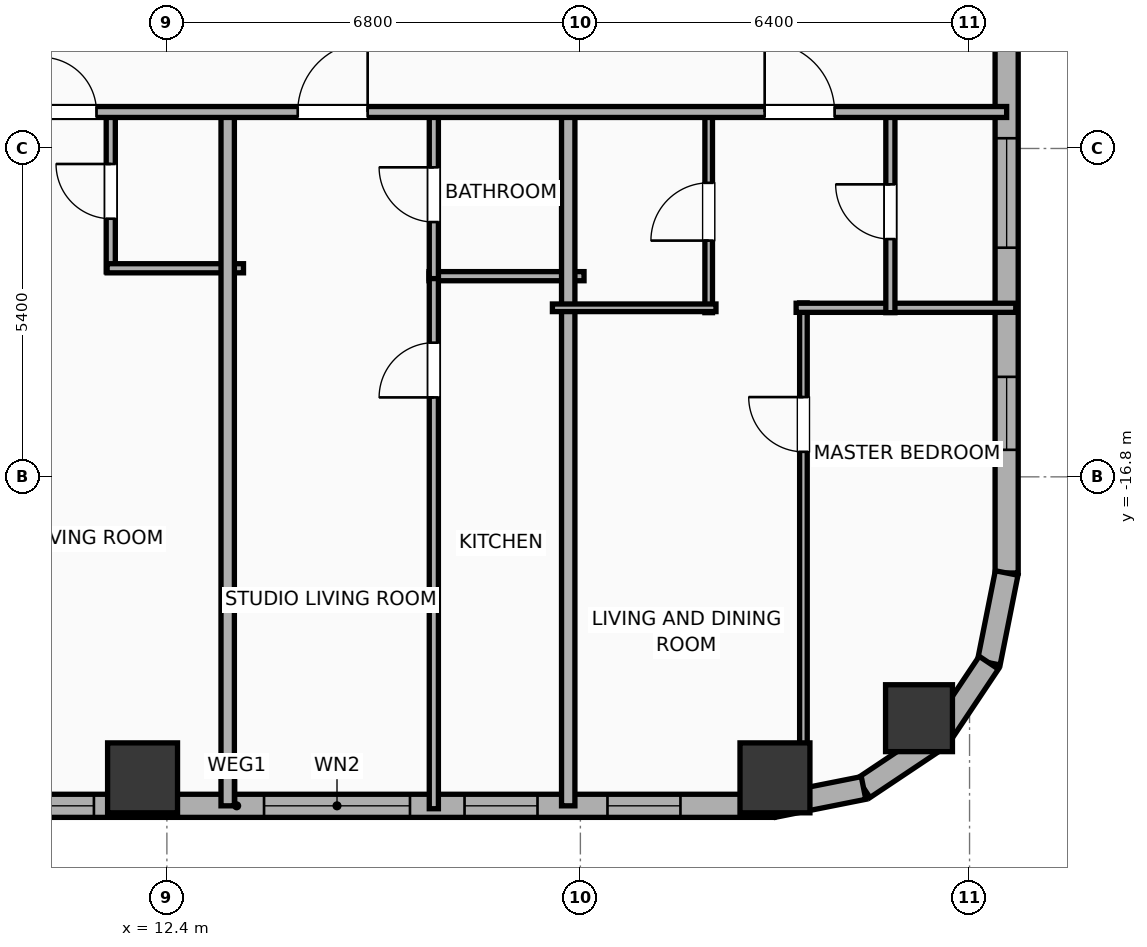
"""IFC4 building model, lengths in metres.
Left out: names, types, materials, properties, quantities, classifications, styles, units other than length and angle.
Written with IfcOpenShell. Run it as: python <this file> out.ifc"""

import sys

from ifc_helpers import new_model, si_unit, direction, frame, frame_2d, origin, origin_2d, place, context, subcontext, project, spatial, rectangle, hollow_rectangle, hollow_circle, extrude, element, fill, save


model = new_model("IFC4")
c1 = context("Model", 3, precision=1e-05, world=origin(), true_north=direction((0.0, 1.0)))
c2 = subcontext(c1, "Body", "Model", "MODEL_VIEW")
j1 = project(units=[si_unit("LENGTHUNIT", "METRE"), si_unit("PLANEANGLEUNIT", "RADIAN")], contexts=[c1])
p1 = place(None, origin())
s1 = spatial("IfcSite", under=j1, at=p1, CompositionType="ELEMENT")
p2 = place(p1, origin())
s2 = spatial("IfcBuilding", under=s1, at=p2, CompositionType="ELEMENT")
p3 = place(p2, frame((0.0, 0.0, 61.1)))
s3 = spatial("IfcBuildingStorey", under=s2, at=p3, CompositionType="ELEMENT", Elevation=61.1)
for number, where, z_axis, x_axis in (
    (1, (12.0, -21.75, 0.0), (0.0, 0.0, 1.0), (1.0, 0.0, 0.0)),
    (2, (22.4, -21.75, 0.0), (0.0, 0.0, 1.0), (1.0, 0.0, 0.0)),
):
    element("IfcColumn", number, at=place(p3, frame(where, z_axis=z_axis, x_axis=x_axis)), inside=s3, PredefinedType="COLUMN", context=c2, shape_type="SweptSolid", body=[
        extrude(hollow_rectangle(XDim=1.15, YDim=1.15, WallThickness=0.04, at=origin_2d()), origin(), (0.0, 0.0, 1.0), 3.9),
    ])
p4 = place(p3, frame((24.769, -20.769, 0.0), z_axis=(0.0, 0.0, 1.0), x_axis=(1.0, 0.0, 0.0)))
e3 = element("IfcColumn", 3, at=p4, inside=s3, PredefinedType="COLUMN", context=c2, shape_type="SweptSolid", body=[
    extrude(hollow_circle(Radius=0.55, WallThickness=0.036, at=origin_2d()), origin(), (0.0, 0.0, 1.0), 3.9),
])
p5 = place(p3, frame((22.381, -22.21, 0.0), z_axis=(0.0, 0.0, 1.0), x_axis=(-1.0, 0.0, 0.0)))
e4 = element("IfcWall", 4, at=p5, inside=s3, PredefinedType="ELEMENTEDWALL", context=c2, shape_type="SweptSolid", body=[
    extrude(rectangle(XDim=17.667, YDim=0.38, at=frame_2d((8.833, 0.0))), origin(), (0.0, 0.0, 1.0), 3.65),
])
p6 = place(p5, frame((5.984, 0.0, 0.75)))
e5 = element("IfcOpeningElement", 5, at=p6, cuts=e4, PredefinedType="OPENING", context=c2, shape_type="SweptSolid", body=[
    extrude(rectangle(XDim=2.4, YDim=2.1, at=frame_2d((1.2, 1.05))), frame((0.0, 0.2, 0.0), z_axis=(0.0, -1.0, 0.0), x_axis=(1.0, 0.0, 0.0)), (0.0, 0.0, 1.0), 0.4),
])
p7 = place(p5, frame((15.079, 0.0, 0.75)))
e6 = element("IfcOpeningElement", 6, at=p7, cuts=e4, PredefinedType="OPENING", context=c2, shape_type="SweptSolid", body=[
    extrude(rectangle(XDim=1.2, YDim=2.05, at=frame_2d((0.6, 1.025))), frame((0.0, 0.2, 0.0), z_axis=(0.0, -1.0, 0.0), x_axis=(1.0, 0.0, 0.0)), (0.0, 0.0, 1.0), 0.4),
])
p8 = place(p5, frame((11.181, 0.0, 0.75)))
e7 = element("IfcOpeningElement", 7, at=p8, cuts=e4, PredefinedType="OPENING", context=c2, shape_type="SweptSolid", body=[
    extrude(rectangle(XDim=1.2, YDim=2.05, at=frame_2d((0.6, 1.025))), frame((0.0, 0.2, 0.0), z_axis=(0.0, -1.0, 0.0), x_axis=(1.0, 0.0, 0.0)), (0.0, 0.0, 1.0), 0.4),
])
p9 = place(p5, frame((3.886, 0.0, 0.75)))
e8 = element("IfcOpeningElement", 8, at=p9, cuts=e4, PredefinedType="OPENING", context=c2, shape_type="SweptSolid", body=[
    extrude(rectangle(XDim=1.2, YDim=2.05, at=frame_2d((0.6, 1.025))), frame((0.0, 0.2, 0.0), z_axis=(0.0, -1.0, 0.0), x_axis=(1.0, 0.0, 0.0)), (0.0, 0.0, 1.0), 0.4),
])
p10 = place(p5, frame((1.536, 0.0, 0.75)))
e9 = element("IfcOpeningElement", 9, at=p10, cuts=e4, PredefinedType="OPENING", context=c2, shape_type="SweptSolid", body=[
    extrude(rectangle(XDim=1.2, YDim=2.05, at=frame_2d((0.6, 1.025))), frame((0.0, 0.2, 0.0), z_axis=(0.0, -1.0, 0.0), x_axis=(1.0, 0.0, 0.0)), (0.0, 0.0, 1.0), 0.4),
])
p11 = place(p3, frame((26.21, -5.882, 0.0), z_axis=(0.0, 0.0, 1.0), x_axis=(0.0, -1.0, 0.0)))
e10 = element("IfcWall", 10, at=p11, inside=s3, PredefinedType="ELEMENTEDWALL", context=c2, shape_type="SweptSolid", body=[
    extrude(rectangle(XDim=12.499, YDim=0.38, at=frame_2d((6.25, 0.0))), origin(), (0.0, 0.0, 1.0), 3.65),
])
p12 = place(p11, frame((5.35, 0.0, 0.75)))
e11 = element("IfcOpeningElement", 11, at=p12, cuts=e10, PredefinedType="OPENING", context=c2, shape_type="SweptSolid", body=[
    extrude(rectangle(XDim=1.8, YDim=2.1, at=frame_2d((0.9, 1.05))), frame((0.0, 0.2, 0.0), z_axis=(0.0, -1.0, 0.0), x_axis=(1.0, 0.0, 0.0)), (0.0, 0.0, 1.0), 0.4),
])
p13 = place(p11, frame((9.274, 0.0, 0.75)))
e12 = element("IfcOpeningElement", 12, at=p13, cuts=e10, PredefinedType="OPENING", context=c2, shape_type="SweptSolid", body=[
    extrude(rectangle(XDim=1.2, YDim=2.05, at=frame_2d((0.6, 1.025))), frame((0.0, 0.2, 0.0), z_axis=(0.0, -1.0, 0.0), x_axis=(1.0, 0.0, 0.0)), (0.0, 0.0, 1.0), 0.4),
])
p14 = place(p3, frame((26.21, -18.381, 0.0), z_axis=(0.0, 0.0, 1.0), x_axis=(-0.195086038585, -0.980786132421, 0.0)))
e13 = element("IfcWall", 13, at=p14, inside=s3, PredefinedType="ELEMENTEDWALL", context=c2, shape_type="SweptSolid", body=[
    extrude(rectangle(XDim=1.504, YDim=0.38, at=frame_2d((0.752, 0.0))), origin(), (0.0, 0.0, 1.0), 3.65),
])
for number, where, z_axis, x_axis in (
    (14, (25.917, -19.857, 0.0), (0.0, 0.0, 1.0), (-0.556, -0.831, 0.0)),
    (15, (25.091, -21.091, 0.0), (0.0, 0.0, 1.0), (-0.831, -0.556, 0.0)),
):
    element("IfcWall", number, at=place(p3, frame(where, z_axis=z_axis, x_axis=x_axis)), inside=s3, PredefinedType="ELEMENTEDWALL", context=c2, shape_type="SweptSolid", body=[
        extrude(rectangle(XDim=1.485, YDim=0.38, at=frame_2d((0.743, 0.0))), origin(), (0.0, 0.0, 1.0), 3.65),
    ])
p15 = place(p3, frame((23.857, -21.917, 0.0), z_axis=(0.0, 0.0, 1.0), x_axis=(-0.980786132421, -0.195086038585, 0.0)))
e16 = element("IfcWall", 16, at=p15, inside=s3, PredefinedType="ELEMENTEDWALL", context=c2, shape_type="SweptSolid", body=[
    extrude(rectangle(XDim=1.504, YDim=0.38, at=frame_2d((0.752, 0.0))), origin(), (0.0, 0.0, 1.0), 3.65),
])
p16 = place(p3, frame((11.477, -13.43, 0.0), z_axis=(0.0, 0.0, 1.0), x_axis=(0.0, 1.0, 0.0)))
e17 = element("IfcWall", 17, at=p16, inside=s3, PredefinedType="PLUMBINGWALL", context=c2, shape_type="SweptSolid", body=[
    extrude(rectangle(XDim=2.65, YDim=0.15, at=frame_2d((1.325, 0.0))), origin(), (0.0, 0.0, 1.0), 3.65),
])
p17 = place(p16, frame((0.875, 0.0, 0.0)))
e18 = element("IfcOpeningElement", 18, at=p17, cuts=e17, PredefinedType="OPENING", context=c2, shape_type="SweptSolid", body=[
    extrude(rectangle(XDim=0.9, YDim=2.05, at=frame_2d((0.45, 1.025))), frame((0.0, 0.085, 0.0), z_axis=(0.0, -1.0, 0.0), x_axis=(1.0, 0.0, 0.0)), (0.0, 0.0, 1.0), 0.17),
])
p18 = place(p3, frame((11.417, -13.37, 0.0), z_axis=(0.0, 0.0, 1.0), x_axis=(1.0, 0.0, 0.0)))
e19 = element("IfcWall", 19, at=p18, inside=s3, PredefinedType="PLUMBINGWALL", context=c2, shape_type="SweptSolid", body=[
    extrude(rectangle(XDim=2.243, YDim=0.15, at=frame_2d((1.122, 0.0))), origin(), (0.0, 0.0, 1.0), 3.65),
])
p19 = place(p3, frame((13.4, -22.21, 0.0), z_axis=(0.0, 0.0, 1.0), x_axis=(0.0, 1.0, 0.0)))
e20 = element("IfcWall", 20, at=p19, inside=s3, PredefinedType="PARTITIONING", context=c2, shape_type="SweptSolid", body=[
    extrude(rectangle(XDim=11.49, YDim=0.22, at=frame_2d((5.745, 0.0))), origin(), (0.0, 0.0, 1.0), 3.65),
])
p20 = place(p3, frame((16.71, -13.5, 0.0), z_axis=(0.0, 0.0, 1.0), x_axis=(1.0, 0.0, 0.0)))
e21 = element("IfcWall", 21, at=p20, inside=s3, PredefinedType="PLUMBINGWALL", context=c2, shape_type="SweptSolid", body=[
    extrude(rectangle(XDim=2.55, YDim=0.15, at=frame_2d((1.275, 0.0))), origin(), (0.0, 0.0, 1.0), 3.65),
])
p21 = place(p3, frame((16.79, -22.258, 0.0), z_axis=(0.0, 0.0, 1.0), x_axis=(0.0, 1.0, 0.0)))
e22 = element("IfcWall", 22, at=p21, inside=s3, PredefinedType="PLUMBINGWALL", context=c2, shape_type="SweptSolid", body=[
    extrude(rectangle(XDim=8.798, YDim=0.15, at=frame_2d((4.399, 0.0))), origin(), (0.0, 0.0, 1.0), 3.65),
])
p22 = place(p21, frame((6.764, 0.0, 0.0)))
e23 = element("IfcOpeningElement", 23, at=p22, cuts=e22, PredefinedType="OPENING", context=c2, shape_type="SweptSolid", body=[
    extrude(rectangle(XDim=0.9, YDim=2.05, at=frame_2d((0.45, 1.025))), frame((0.0, 0.085, 0.0), z_axis=(0.0, -1.0, 0.0), x_axis=(1.0, 0.0, 0.0)), (0.0, 0.0, 1.0), 0.17),
])
p23 = place(p3, frame((16.79, -13.54, 0.0), z_axis=(0.0, 0.0, 1.0), x_axis=(0.0, 1.0, 0.0)))
e24 = element("IfcWall", 24, at=p23, inside=s3, PredefinedType="PLUMBINGWALL", context=c2, shape_type="SweptSolid", body=[
    extrude(rectangle(XDim=2.76, YDim=0.15, at=frame_2d((1.38, 0.0))), origin(), (0.0, 0.0, 1.0), 3.65),
])
p24 = place(p23, frame((0.93, 0.0, 0.0)))
e25 = element("IfcOpeningElement", 25, at=p24, cuts=e24, PredefinedType="OPENING", context=c2, shape_type="SweptSolid", body=[
    extrude(rectangle(XDim=0.9, YDim=2.05, at=frame_2d((0.45, 1.025))), frame((0.0, 0.085, 0.0), z_axis=(0.0, -1.0, 0.0), x_axis=(1.0, 0.0, 0.0)), (0.0, 0.0, 1.0), 0.17),
])
p25 = place(p3, frame((19.0, -22.21, 0.0), z_axis=(0.0, 0.0, 1.0), x_axis=(0.0, 1.0, 0.0)))
e26 = element("IfcWall", 26, at=p25, inside=s3, PredefinedType="PARTITIONING", context=c2, shape_type="SweptSolid", body=[
    extrude(rectangle(XDim=11.49, YDim=0.22, at=frame_2d((5.745, 0.0))), origin(), (0.0, 0.0, 1.0), 3.65),
])
p26 = place(p3, frame((22.868, -22.266, 0.0), z_axis=(0.0, 0.0, 1.0), x_axis=(0.0, 1.0, 0.0)))
e27 = element("IfcWall", 27, at=p26, inside=s3, PredefinedType="PARTITIONING", context=c2, shape_type="SweptSolid", body=[
    extrude(rectangle(XDim=8.326, YDim=0.125, at=frame_2d((4.163, 0.0))), origin(), (0.0, 0.0, 1.0), 3.65),
])
p27 = place(p26, frame((5.878, 0.0, 0.0)))
e28 = element("IfcOpeningElement", 28, at=p27, cuts=e27, PredefinedType="OPENING", context=c2, shape_type="SweptSolid", body=[
    extrude(rectangle(XDim=0.9, YDim=2.05, at=frame_2d((0.45, 1.025))), frame((0.0, 0.073, 0.0), z_axis=(0.0, -1.0, 0.0), x_axis=(1.0, 0.0, 0.0)), (0.0, 0.0, 1.0), 0.145),
])
p28 = place(p3, frame((22.748, -14.02, 0.0), z_axis=(0.0, 0.0, 1.0), x_axis=(1.0, 0.0, 0.0)))
e29 = element("IfcWall", 29, at=p28, inside=s3, PredefinedType="PLUMBINGWALL", context=c2, shape_type="SweptSolid", body=[
    extrude(rectangle(XDim=3.612, YDim=0.15, at=frame_2d((1.806, 0.0))), origin(), (0.0, 0.0, 1.0), 3.65),
])
p29 = place(p3, frame((21.31, -14.1, 0.0), z_axis=(0.0, 0.0, 1.0), x_axis=(0.0, 1.0, 0.0)))
e30 = element("IfcWall", 30, at=p29, inside=s3, PredefinedType="PARTITIONING", context=c2, shape_type="SweptSolid", body=[
    extrude(rectangle(XDim=3.32, YDim=0.125, at=frame_2d((1.66, 0.0))), origin(), (0.0, 0.0, 1.0), 3.65),
])
p30 = place(p29, frame((1.185, 0.0, 0.0)))
e31 = element("IfcOpeningElement", 31, at=p30, cuts=e30, PredefinedType="OPENING", context=c2, shape_type="SweptSolid", body=[
    extrude(rectangle(XDim=0.95, YDim=2.05, at=frame_2d((0.475, 1.025))), frame((0.0, 0.073, 0.0), z_axis=(0.0, -1.0, 0.0), x_axis=(1.0, 0.0, 0.0)), (0.0, 0.0, 1.0), 0.145),
])
p31 = place(p3, frame((18.74, -14.02, 0.0), z_axis=(0.0, 0.0, 1.0), x_axis=(1.0, 0.0, 0.0)))
e32 = element("IfcWall", 32, at=p31, inside=s3, PredefinedType="PARTITIONING", context=c2, shape_type="SweptSolid", body=[
    extrude(rectangle(XDim=2.69, YDim=0.125, at=frame_2d((1.345, 0.0))), origin(), (0.0, 0.0, 1.0), 3.65),
])
p32 = place(p3, frame((24.298, -14.1, 0.0), z_axis=(0.0, 0.0, 1.0), x_axis=(0.0, 1.0, 0.0)))
e33 = element("IfcWall", 33, at=p32, inside=s3, PredefinedType="PLUMBINGWALL", context=c2, shape_type="SweptSolid", body=[
    extrude(rectangle(XDim=3.32, YDim=0.15, at=frame_2d((1.66, 0.0))), origin(), (0.0, 0.0, 1.0), 3.65),
])
p33 = place(p32, frame((1.21, 0.0, 0.0)))
e34 = element("IfcOpeningElement", 34, at=p33, cuts=e33, PredefinedType="OPENING", context=c2, shape_type="SweptSolid", body=[
    extrude(rectangle(XDim=0.9, YDim=2.05, at=frame_2d((0.45, 1.025))), frame((0.0, 0.085, 0.0), z_axis=(0.0, -1.0, 0.0), x_axis=(1.0, 0.0, 0.0)), (0.0, 0.0, 1.0), 0.17),
])
p34 = place(p3, frame((-33.41, -10.8, 0.0), z_axis=(0.0, 0.0, 1.0), x_axis=(1.0, 0.0, 0.0)))
e35 = element("IfcWall", 35, at=p34, inside=s3, PredefinedType="PARTITIONING", context=c2, shape_type="SweptSolid", body=[
    extrude(rectangle(XDim=59.62, YDim=0.18, at=frame_2d((29.81, 0.0))), origin(), (0.0, 0.0, 1.0), 3.65),
])
p35 = place(p34, frame((3.36, 0.0, 0.0)))
e36 = element("IfcOpeningElement", 36, at=p35, cuts=e35, PredefinedType="OPENING", context=c2, shape_type="SweptSolid", body=[
    extrude(rectangle(XDim=1.15, YDim=2.05, at=frame_2d((0.575, 1.025))), frame((0.0, 0.1, 0.0), z_axis=(0.0, -1.0, 0.0), x_axis=(1.0, 0.0, 0.0)), (0.0, 0.0, 1.0), 0.2),
])
p36 = place(p34, frame((10.908, 0.0, 0.0)))
e37 = element("IfcOpeningElement", 37, at=p36, cuts=e35, PredefinedType="OPENING", context=c2, shape_type="SweptSolid", body=[
    extrude(rectangle(XDim=1.15, YDim=2.05, at=frame_2d((0.575, 1.025))), frame((0.0, 0.1, 0.0), z_axis=(0.0, -1.0, 0.0), x_axis=(1.0, 0.0, 0.0)), (0.0, 0.0, 1.0), 0.2),
])
p37 = place(p34, frame((15.755, 0.0, 0.0)))
e38 = element("IfcOpeningElement", 38, at=p37, cuts=e35, PredefinedType="OPENING", context=c2, shape_type="SweptSolid", body=[
    extrude(rectangle(XDim=0.9, YDim=2.05, at=frame_2d((0.45, 1.025))), frame((0.0, 0.1, 0.0), z_axis=(0.0, -1.0, 0.0), x_axis=(1.0, 0.0, 0.0)), (0.0, 0.0, 1.0), 0.2),
])
p38 = place(p34, frame((22.11, 0.0, 0.0)))
e39 = element("IfcOpeningElement", 39, at=p38, cuts=e35, PredefinedType="OPENING", context=c2, shape_type="SweptSolid", body=[
    extrude(rectangle(XDim=1.15, YDim=2.05, at=frame_2d((0.575, 1.025))), frame((0.0, 0.1, 0.0), z_axis=(0.0, -1.0, 0.0), x_axis=(1.0, 0.0, 0.0)), (0.0, 0.0, 1.0), 0.2),
])
p39 = place(p34, frame((27.709, 0.0, 0.0)))
e40 = element("IfcOpeningElement", 40, at=p39, cuts=e35, PredefinedType="OPENING", context=c2, shape_type="SweptSolid", body=[
    extrude(rectangle(XDim=1.15, YDim=2.05, at=frame_2d((0.575, 1.025))), frame((0.0, 0.1, 0.0), z_axis=(0.0, -1.0, 0.0), x_axis=(1.0, 0.0, 0.0)), (0.0, 0.0, 1.0), 0.2),
])
p40 = place(p34, frame((33.349, 0.0, 0.0)))
e41 = element("IfcOpeningElement", 41, at=p40, cuts=e35, PredefinedType="OPENING", context=c2, shape_type="SweptSolid", body=[
    extrude(rectangle(XDim=1.15, YDim=2.05, at=frame_2d((0.575, 1.025))), frame((0.0, 0.1, 0.0), z_axis=(0.0, -1.0, 0.0), x_axis=(1.0, 0.0, 0.0)), (0.0, 0.0, 1.0), 0.2),
])
p41 = place(p34, frame((36.759, 0.0, 0.0)))
e42 = element("IfcOpeningElement", 42, at=p41, cuts=e35, PredefinedType="OPENING", context=c2, shape_type="SweptSolid", body=[
    extrude(rectangle(XDim=1.15, YDim=2.05, at=frame_2d((0.575, 1.025))), frame((0.0, 0.1, 0.0), z_axis=(0.0, -1.0, 0.0), x_axis=(1.0, 0.0, 0.0)), (0.0, 0.0, 1.0), 0.2),
])
p42 = place(p34, frame((43.752, 0.0, 0.0)))
e43 = element("IfcOpeningElement", 43, at=p42, cuts=e35, PredefinedType="OPENING", context=c2, shape_type="SweptSolid", body=[
    extrude(rectangle(XDim=0.9, YDim=2.05, at=frame_2d((0.45, 1.025))), frame((0.0, 0.1, 0.0), z_axis=(0.0, -1.0, 0.0), x_axis=(1.0, 0.0, 0.0)), (0.0, 0.0, 1.0), 0.2),
])
p43 = place(p34, frame((47.962, 0.0, 0.0)))
e44 = element("IfcOpeningElement", 44, at=p43, cuts=e35, PredefinedType="OPENING", context=c2, shape_type="SweptSolid", body=[
    extrude(rectangle(XDim=1.15, YDim=2.05, at=frame_2d((0.575, 1.025))), frame((0.0, 0.1, 0.0), z_axis=(0.0, -1.0, 0.0), x_axis=(1.0, 0.0, 0.0)), (0.0, 0.0, 1.0), 0.2),
])
p44 = place(p34, frame((55.641, 0.0, 0.0)))
e45 = element("IfcOpeningElement", 45, at=p44, cuts=e35, PredefinedType="OPENING", context=c2, shape_type="SweptSolid", body=[
    extrude(rectangle(XDim=1.15, YDim=2.05, at=frame_2d((0.575, 1.025))), frame((0.0, 0.1, 0.0), z_axis=(0.0, -1.0, 0.0), x_axis=(1.0, 0.0, 0.0)), (0.0, 0.0, 1.0), 0.2),
])
p45 = place(p6, origin())
e46 = element("IfcWindow", 46, at=p45, inside=s3, PartitioningType="SINGLE_PANEL", PredefinedType="WINDOW", context=c2, shape_type="SweptSolid", body=[
    extrude(rectangle(XDim=2.4, YDim=2.1, at=frame_2d((1.2, 1.05))), frame((0.0, 0.03, 0.0), z_axis=(0.0, -1.0, 0.0), x_axis=(1.0, 0.0, 0.0)), (0.0, 0.0, 1.0), 0.06),
])
fill(e5, e46)
p46 = place(p12, origin())
e47 = element("IfcWindow", 47, at=p46, inside=s3, PartitioningType="SINGLE_PANEL", PredefinedType="WINDOW", context=c2, shape_type="SweptSolid", body=[
    extrude(rectangle(XDim=1.8, YDim=2.1, at=frame_2d((0.9, 1.05))), frame((0.0, 0.03, 0.0), z_axis=(0.0, -1.0, 0.0), x_axis=(1.0, 0.0, 0.0)), (0.0, 0.0, 1.0), 0.06),
])
fill(e11, e47)
p47 = place(p8, origin())
e48 = element("IfcWindow", 48, at=p47, inside=s3, PartitioningType="SINGLE_PANEL", PredefinedType="WINDOW", context=c2, shape_type="SweptSolid", body=[
    extrude(rectangle(XDim=1.2, YDim=2.05, at=frame_2d((0.6, 1.025))), frame((0.0, 0.03, 0.0), z_axis=(0.0, -1.0, 0.0), x_axis=(1.0, 0.0, 0.0)), (0.0, 0.0, 1.0), 0.06),
])
fill(e7, e48)
p48 = place(p9, origin())
e49 = element("IfcWindow", 49, at=p48, inside=s3, PartitioningType="SINGLE_PANEL", PredefinedType="WINDOW", context=c2, shape_type="SweptSolid", body=[
    extrude(rectangle(XDim=1.2, YDim=2.05, at=frame_2d((0.6, 1.025))), frame((0.0, 0.03, 0.0), z_axis=(0.0, -1.0, 0.0), x_axis=(1.0, 0.0, 0.0)), (0.0, 0.0, 1.0), 0.06),
])
fill(e8, e49)
p49 = place(p10, origin())
e50 = element("IfcWindow", 50, at=p49, inside=s3, PartitioningType="SINGLE_PANEL", PredefinedType="WINDOW", context=c2, shape_type="SweptSolid", body=[
    extrude(rectangle(XDim=1.2, YDim=2.05, at=frame_2d((0.6, 1.025))), frame((0.0, 0.03, 0.0), z_axis=(0.0, -1.0, 0.0), x_axis=(1.0, 0.0, 0.0)), (0.0, 0.0, 1.0), 0.06),
])
fill(e9, e50)
p50 = place(p13, origin())
e51 = element("IfcWindow", 51, at=p50, inside=s3, PartitioningType="SINGLE_PANEL", PredefinedType="WINDOW", context=c2, shape_type="SweptSolid", body=[
    extrude(rectangle(XDim=1.2, YDim=2.05, at=frame_2d((0.6, 1.025))), frame((0.0, 0.03, 0.0), z_axis=(0.0, -1.0, 0.0), x_axis=(1.0, 0.0, 0.0)), (0.0, 0.0, 1.0), 0.06),
])
fill(e12, e51)
p51 = place(p17, origin())
e52 = element("IfcDoor", 52, at=p51, inside=s3, OperationType="SINGLE_SWING_RIGHT", PredefinedType="DOOR", context=c2, shape_type="SweptSolid", body=[
    extrude(rectangle(XDim=0.9, YDim=2.05, at=frame_2d((0.45, 1.025))), frame((0.0, 0.025, 0.0), z_axis=(0.0, -1.0, 0.0), x_axis=(1.0, 0.0, 0.0)), (0.0, 0.0, 1.0), 0.05),
])
fill(e18, e52)
p52 = place(p22, origin())
e53 = element("IfcDoor", 53, at=p52, inside=s3, OperationType="SINGLE_SWING_LEFT", PredefinedType="DOOR", context=c2, shape_type="SweptSolid", body=[
    extrude(rectangle(XDim=0.9, YDim=2.05, at=frame_2d((0.45, 1.025))), frame((0.0, 0.025, 0.0), z_axis=(0.0, -1.0, 0.0), x_axis=(1.0, 0.0, 0.0)), (0.0, 0.0, 1.0), 0.05),
])
fill(e23, e53)
p53 = place(p24, origin())
e54 = element("IfcDoor", 54, at=p53, inside=s3, OperationType="SINGLE_SWING_RIGHT", PredefinedType="DOOR", context=c2, shape_type="SweptSolid", body=[
    extrude(rectangle(XDim=0.9, YDim=2.05, at=frame_2d((0.45, 1.025))), frame((0.0, 0.025, 0.0), z_axis=(0.0, -1.0, 0.0), x_axis=(1.0, 0.0, 0.0)), (0.0, 0.0, 1.0), 0.05),
])
fill(e25, e54)
p54 = place(p27, origin())
e55 = element("IfcDoor", 55, at=p54, inside=s3, OperationType="SINGLE_SWING_RIGHT", PredefinedType="DOOR", context=c2, shape_type="SweptSolid", body=[
    extrude(rectangle(XDim=0.9, YDim=2.05, at=frame_2d((0.45, 1.025))), frame((0.0, 0.025, 0.0), z_axis=(0.0, -1.0, 0.0), x_axis=(1.0, 0.0, 0.0)), (0.0, 0.0, 1.0), 0.05),
])
fill(e28, e55)
p55 = place(p30, origin())
e56 = element("IfcDoor", 56, at=p55, inside=s3, OperationType="SINGLE_SWING_LEFT", PredefinedType="DOOR", context=c2, shape_type="SweptSolid", body=[
    extrude(rectangle(XDim=0.95, YDim=2.05, at=frame_2d((0.475, 1.025))), frame((0.0, 0.025, 0.0), z_axis=(0.0, -1.0, 0.0), x_axis=(1.0, 0.0, 0.0)), (0.0, 0.0, 1.0), 0.05),
])
fill(e31, e56)
p56 = place(p33, origin())
e57 = element("IfcDoor", 57, at=p56, inside=s3, OperationType="SINGLE_SWING_RIGHT", PredefinedType="DOOR", context=c2, shape_type="SweptSolid", body=[
    extrude(rectangle(XDim=0.9, YDim=2.05, at=frame_2d((0.45, 1.025))), frame((0.0, 0.025, 0.0), z_axis=(0.0, -1.0, 0.0), x_axis=(1.0, 0.0, 0.0)), (0.0, 0.0, 1.0), 0.05),
])
fill(e34, e57)
p57 = place(p42, origin())
e58 = element("IfcDoor", 58, at=p57, inside=s3, OperationType="SINGLE_SWING_LEFT", PredefinedType="DOOR", context=c2, shape_type="SweptSolid", body=[
    extrude(rectangle(XDim=0.9, YDim=2.05, at=frame_2d((0.45, 1.025))), frame((0.0, 0.025, 0.0), z_axis=(0.0, -1.0, 0.0), x_axis=(1.0, 0.0, 0.0)), (0.0, 0.0, 1.0), 0.05),
])
fill(e43, e58)
p58 = place(p43, origin())
e59 = element("IfcDoor", 59, at=p58, inside=s3, OperationType="SINGLE_SWING_RIGHT", PredefinedType="DOOR", context=c2, shape_type="SweptSolid", body=[
    extrude(rectangle(XDim=1.15, YDim=2.05, at=frame_2d((0.575, 1.025))), frame((0.0, 0.025, 0.0), z_axis=(0.0, -1.0, 0.0), x_axis=(1.0, 0.0, 0.0)), (0.0, 0.0, 1.0), 0.05),
])
fill(e44, e59)
p59 = place(p44, origin())
e60 = element("IfcDoor", 60, at=p59, inside=s3, OperationType="SINGLE_SWING_LEFT", PredefinedType="DOOR", context=c2, shape_type="SweptSolid", body=[
    extrude(rectangle(XDim=1.15, YDim=2.05, at=frame_2d((0.575, 1.025))), frame((0.0, 0.025, 0.0), z_axis=(0.0, -1.0, 0.0), x_axis=(1.0, 0.0, 0.0)), (0.0, 0.0, 1.0), 0.05),
])
fill(e45, e60)
save(model, sys.argv[1])
